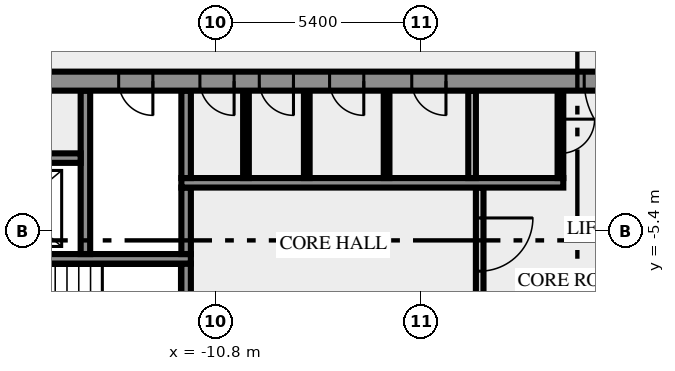
"""IFC4 building model, lengths in metres.
Left out: names, types, materials, properties, quantities, classifications, styles, units other than length and angle.
Written with IfcOpenShell. Run it as: python <this file> out.ifc"""

import sys

from ifc_helpers import new_model, si_unit, direction, frame, frame_2d, origin, place, context, subcontext, project, spatial, rectangle, extrude, element, fill, save


model = new_model("IFC4")
c1 = context("Model", 3, precision=1e-05, world=origin(), true_north=direction((0.0, 1.0)))
c2 = subcontext(c1, "Body", "Model", "MODEL_VIEW")
j1 = project(units=[si_unit("LENGTHUNIT", "METRE"), si_unit("PLANEANGLEUNIT", "RADIAN")], contexts=[c1])
p1 = place(None, origin())
s1 = spatial("IfcSite", under=j1, at=p1, CompositionType="ELEMENT")
p2 = place(p1, origin())
s2 = spatial("IfcBuilding", under=s1, at=p2, CompositionType="ELEMENT")
p3 = place(p2, frame((0.0, 0.0, 180.0)))
s3 = spatial("IfcBuildingStorey", under=s2, at=p3, CompositionType="ELEMENT", Elevation=180.0)
p4 = place(p3, frame((-11.575, -7.25, 0.0), z_axis=(0.0, 0.0, 1.0), x_axis=(0.0, 1.0, 0.0)))
e1 = element("IfcWall", 1, at=p4, inside=s3, PredefinedType="SHEAR", context=c2, shape_type="SweptSolid", body=[
    extrude(rectangle(XDim=1.0, YDim=0.25, at=frame_2d((0.5, 0.0))), origin(), (0.0, 0.0, 1.0), 3.65),
])
p5 = place(p3, frame((-3.85, -4.25, 0.0), z_axis=(0.0, 0.0, 1.0), x_axis=(0.0, -1.0, 0.0)))
e2 = element("IfcWall", 2, at=p5, inside=s3, PredefinedType="SOLIDWALL", context=c2, shape_type="SweptSolid", body=[
    extrude(rectangle(XDim=3.0, YDim=0.2, at=frame_2d((1.5, 0.0))), origin(), (0.0, 0.0, 1.0), 3.65),
])
p6 = place(p5, frame((0.8, 0.0, 0.0)))
e3 = element("IfcOpeningElement", 3, at=p6, cuts=e2, PredefinedType="OPENING", context=c2, shape_type="SweptSolid", body=[
    extrude(rectangle(XDim=1.4, YDim=2.1, at=frame_2d((0.7, 1.05))), frame((0.0, 0.11, 0.0), z_axis=(0.0, -1.0, 0.0), x_axis=(1.0, 0.0, 0.0)), (0.0, 0.0, 1.0), 0.22),
])
p7 = place(p3, frame((-11.45, -6.125, 0.0), z_axis=(0.0, 0.0, 1.0), x_axis=(-1.0, 0.0, 0.0)))
e4 = element("IfcWall", 4, at=p7, inside=s3, PredefinedType="SHEAR", context=c2, shape_type="SweptSolid", body=[
    extrude(rectangle(XDim=8.05, YDim=0.25, at=frame_2d((4.025, 0.0))), origin(), (0.0, 0.0, 1.0), 3.65),
])
p8 = place(p7, frame((6.2, 0.0, 0.0)))
e5 = element("IfcOpeningElement", 5, at=p8, cuts=e4, PredefinedType="OPENING", context=c2, shape_type="SweptSolid", body=[
    extrude(rectangle(XDim=1.8, YDim=2.1, at=frame_2d((0.9, 1.05))), frame((0.0, 0.135, 0.0), z_axis=(0.0, -1.0, 0.0), x_axis=(1.0, 0.0, 0.0)), (0.0, 0.0, 1.0), 0.27),
])
p9 = place(p3, frame((-14.225, -6.0, 0.0), z_axis=(0.0, 0.0, 1.0), x_axis=(0.0, 1.0, 0.0)))
e6 = element("IfcWall", 6, at=p9, inside=s3, PredefinedType="SHEAR", context=c2, shape_type="SweptSolid", body=[
    extrude(rectangle(XDim=4.3, YDim=0.25, at=frame_2d((2.15, 0.0))), origin(), (0.0, 0.0, 1.0), 3.65),
])
p10 = place(p3, frame((-11.575, -6.0, 0.0), z_axis=(0.0, 0.0, 1.0), x_axis=(0.0, 1.0, 0.0)))
e7 = element("IfcWall", 7, at=p10, inside=s3, PredefinedType="SHEAR", context=c2, shape_type="SweptSolid", body=[
    extrude(rectangle(XDim=1.75, YDim=0.25, at=frame_2d((0.875, 0.0))), origin(), (0.0, 0.0, 1.0), 3.65),
])
p11 = place(p3, frame((-11.7, -4.125, 0.0), z_axis=(0.0, 0.0, 1.0), x_axis=(1.0, 0.0, 0.0)))
e8 = element("IfcWall", 8, at=p11, inside=s3, PredefinedType="SHEAR", context=c2, shape_type="SweptSolid", body=[
    extrude(rectangle(XDim=10.05, YDim=0.25, at=frame_2d((5.025, 0.0))), origin(), (0.0, 0.0, 1.0), 3.65),
])
p12 = place(p3, frame((-11.575, -4.0, 0.0), z_axis=(0.0, 0.0, 1.0), x_axis=(0.0, 1.0, 0.0)))
e9 = element("IfcWall", 9, at=p12, inside=s3, PredefinedType="SHEAR", context=c2, shape_type="SweptSolid", body=[
    extrude(rectangle(XDim=2.3, YDim=0.25, at=frame_2d((1.15, 0.0))), origin(), (0.0, 0.0, 1.0), 3.65),
])
for number, where, z_axis, x_axis in (
    (10, (-10.0, -4.0, 0.0), (0.0, 0.0, 1.0), (0.0, 1.0, 0.0)),
    (11, (-8.4, -4.0, 0.0), (0.0, 0.0, 1.0), (0.0, 1.0, 0.0)),
    (12, (-6.3, -4.0, 0.0), (0.0, 0.0, 1.0), (0.0, 1.0, 0.0)),
):
    element("IfcWall", number, at=place(p3, frame(where, z_axis=z_axis, x_axis=x_axis)), inside=s3, PredefinedType="PARTITIONING", context=c2, shape_type="SweptSolid", body=[
        extrude(rectangle(XDim=2.3, YDim=0.15, at=frame_2d((1.15, 0.0))), origin(), (0.0, 0.0, 1.0), 3.65),
    ])
p13 = place(p3, frame((-4.05, -4.0, 0.0), z_axis=(0.0, 0.0, 1.0), x_axis=(0.0, 1.0, 0.0)))
e13 = element("IfcWall", 13, at=p13, inside=s3, PredefinedType="SOLIDWALL", context=c2, shape_type="SweptSolid", body=[
    extrude(rectangle(XDim=2.3, YDim=0.2, at=frame_2d((1.15, 0.0))), origin(), (0.0, 0.0, 1.0), 3.65),
])
p14 = place(p3, frame((-1.725, -1.7, 0.0), z_axis=(0.0, 0.0, 1.0), x_axis=(0.0, -1.0, 0.0)))
e14 = element("IfcWall", 14, at=p14, inside=s3, PredefinedType="PARTITIONING", context=c2, shape_type="SweptSolid", body=[
    extrude(rectangle(XDim=2.3, YDim=0.15, at=frame_2d((1.15, 0.0))), origin(), (0.0, 0.0, 1.0), 3.65),
])
p15 = place(p14, frame((0.75, 0.0, 0.0)))
e15 = element("IfcOpeningElement", 15, at=p15, cuts=e14, PredefinedType="OPENING", context=c2, shape_type="SweptSolid", body=[
    extrude(rectangle(XDim=0.9, YDim=2.1, at=frame_2d((0.45, 1.05))), frame((0.0, 0.085, 0.0), z_axis=(0.0, -1.0, 0.0), x_axis=(1.0, 0.0, 0.0)), (0.0, 0.0, 1.0), 0.17),
])
p16 = place(p3, frame((-17.35, -3.475, 0.0), z_axis=(0.0, 0.0, 1.0), x_axis=(1.0, 0.0, 0.0)))
e16 = element("IfcWall", 16, at=p16, inside=s3, PredefinedType="SHEAR", context=c2, shape_type="SweptSolid", body=[
    extrude(rectangle(XDim=3.0, YDim=0.25, at=frame_2d((1.5, 0.0))), origin(), (0.0, 0.0, 1.0), 3.65),
])
p17 = place(p3, frame((20.49, -1.45, 0.0), z_axis=(0.0, 0.0, 1.0), x_axis=(-1.0, 0.0, 0.0)))
e17 = element("IfcWall", 17, at=p17, inside=s3, PredefinedType="SHEAR", context=c2, shape_type="SweptSolid", body=[
    extrude(rectangle(XDim=40.98, YDim=0.5, at=frame_2d((20.49, 0.0))), origin(), (0.0, 0.0, 1.0), 3.65),
])
p18 = place(p17, frame((38.14, 0.0, 0.0)))
e18 = element("IfcOpeningElement", 18, at=p18, cuts=e17, PredefinedType="OPENING", context=c2, shape_type="SweptSolid", body=[
    extrude(rectangle(XDim=1.8, YDim=2.1, at=frame_2d((0.9, 1.05))), frame((0.0, 0.26, 0.0), z_axis=(0.0, -1.0, 0.0), x_axis=(1.0, 0.0, 0.0)), (0.0, 0.0, 1.0), 0.52),
])
p19 = place(p17, frame((35.89, 0.0, 0.0)))
e19 = element("IfcOpeningElement", 19, at=p19, cuts=e17, PredefinedType="OPENING", context=c2, shape_type="SweptSolid", body=[
    extrude(rectangle(XDim=0.9, YDim=2.1, at=frame_2d((0.45, 1.05))), frame((0.0, 0.26, 0.0), z_axis=(0.0, -1.0, 0.0), x_axis=(1.0, 0.0, 0.0)), (0.0, 0.0, 1.0), 0.52),
])
p20 = place(p17, frame((32.94, 0.0, 0.0)))
e20 = element("IfcOpeningElement", 20, at=p20, cuts=e17, PredefinedType="OPENING", context=c2, shape_type="SweptSolid", body=[
    extrude(rectangle(XDim=0.9, YDim=2.1, at=frame_2d((0.45, 1.05))), frame((0.0, 0.26, 0.0), z_axis=(0.0, -1.0, 0.0), x_axis=(1.0, 0.0, 0.0)), (0.0, 0.0, 1.0), 0.52),
])
p21 = place(p17, frame((30.802, 0.0, 0.0)))
e21 = element("IfcOpeningElement", 21, at=p21, cuts=e17, PredefinedType="OPENING", context=c2, shape_type="SweptSolid", body=[
    extrude(rectangle(XDim=0.9, YDim=2.1, at=frame_2d((0.45, 1.05))), frame((0.0, 0.26, 0.0), z_axis=(0.0, -1.0, 0.0), x_axis=(1.0, 0.0, 0.0)), (0.0, 0.0, 1.0), 0.52),
])
p22 = place(p17, frame((29.24, 0.0, 0.0)))
e22 = element("IfcOpeningElement", 22, at=p22, cuts=e17, PredefinedType="OPENING", context=c2, shape_type="SweptSolid", body=[
    extrude(rectangle(XDim=0.9, YDim=2.1, at=frame_2d((0.45, 1.05))), frame((0.0, 0.26, 0.0), z_axis=(0.0, -1.0, 0.0), x_axis=(1.0, 0.0, 0.0)), (0.0, 0.0, 1.0), 0.52),
])
p23 = place(p17, frame((27.39, 0.0, 0.0)))
e23 = element("IfcOpeningElement", 23, at=p23, cuts=e17, PredefinedType="OPENING", context=c2, shape_type="SweptSolid", body=[
    extrude(rectangle(XDim=0.9, YDim=2.1, at=frame_2d((0.45, 1.05))), frame((0.0, 0.26, 0.0), z_axis=(0.0, -1.0, 0.0), x_axis=(1.0, 0.0, 0.0)), (0.0, 0.0, 1.0), 0.52),
])
p24 = place(p17, frame((25.228, 0.0, 0.0)))
e24 = element("IfcOpeningElement", 24, at=p24, cuts=e17, PredefinedType="OPENING", context=c2, shape_type="SweptSolid", body=[
    extrude(rectangle(XDim=0.9, YDim=2.1, at=frame_2d((0.45, 1.05))), frame((0.0, 0.26, 0.0), z_axis=(0.0, -1.0, 0.0), x_axis=(1.0, 0.0, 0.0)), (0.0, 0.0, 1.0), 0.52),
])
p25 = place(p17, frame((19.59, 0.0, 0.0)))
e25 = element("IfcOpeningElement", 25, at=p25, cuts=e17, PredefinedType="OPENING", context=c2, shape_type="SweptSolid", body=[
    extrude(rectangle(XDim=2.0, YDim=2.1, at=frame_2d((1.0, 1.05))), frame((0.0, 0.26, 0.0), z_axis=(0.0, -1.0, 0.0), x_axis=(1.0, 0.0, 0.0)), (0.0, 0.0, 1.0), 0.52),
])
p26 = place(p17, frame((7.14, 0.0, 0.0)))
e26 = element("IfcOpeningElement", 26, at=p26, cuts=e17, PredefinedType="OPENING", context=c2, shape_type="SweptSolid", body=[
    extrude(rectangle(XDim=0.9, YDim=2.1, at=frame_2d((0.45, 1.05))), frame((0.0, 0.26, 0.0), z_axis=(0.0, -1.0, 0.0), x_axis=(1.0, 0.0, 0.0)), (0.0, 0.0, 1.0), 0.52),
])
p27 = place(p17, frame((5.028, 0.0, 0.0)))
e27 = element("IfcOpeningElement", 27, at=p27, cuts=e17, PredefinedType="OPENING", context=c2, shape_type="SweptSolid", body=[
    extrude(rectangle(XDim=0.8, YDim=2.1, at=frame_2d((0.4, 1.05))), frame((0.0, 0.26, 0.0), z_axis=(0.0, -1.0, 0.0), x_axis=(1.0, 0.0, 0.0)), (0.0, 0.0, 1.0), 0.52),
])
p28 = place(p17, frame((3.452, 0.0, 0.0)))
e28 = element("IfcOpeningElement", 28, at=p28, cuts=e17, PredefinedType="OPENING", context=c2, shape_type="SweptSolid", body=[
    extrude(rectangle(XDim=0.8, YDim=2.1, at=frame_2d((0.4, 1.05))), frame((0.0, 0.26, 0.0), z_axis=(0.0, -1.0, 0.0), x_axis=(1.0, 0.0, 0.0)), (0.0, 0.0, 1.0), 0.52),
])
p29 = place(p17, frame((1.04, 0.0, 0.0)))
e29 = element("IfcOpeningElement", 29, at=p29, cuts=e17, PredefinedType="OPENING", context=c2, shape_type="SweptSolid", body=[
    extrude(rectangle(XDim=1.8, YDim=2.1, at=frame_2d((0.9, 1.05))), frame((0.0, 0.26, 0.0), z_axis=(0.0, -1.0, 0.0), x_axis=(1.0, 0.0, 0.0)), (0.0, 0.0, 1.0), 0.52),
])
p30 = place(p6, origin())
e30 = element("IfcDoor", 30, at=p30, inside=s3, OperationType="DOUBLE_DOOR_SINGLE_SWING", PredefinedType="DOOR", context=c2, shape_type="SweptSolid", body=[
    extrude(rectangle(XDim=1.4, YDim=2.1, at=frame_2d((0.7, 1.05))), frame((0.0, 0.025, 0.0), z_axis=(0.0, -1.0, 0.0), x_axis=(1.0, 0.0, 0.0)), (0.0, 0.0, 1.0), 0.05),
])
fill(e3, e30)
p31 = place(p15, origin())
e31 = element("IfcDoor", 31, at=p31, inside=s3, OperationType="SINGLE_SWING_RIGHT", PredefinedType="DOOR", context=c2, shape_type="SweptSolid", body=[
    extrude(rectangle(XDim=0.9, YDim=2.1, at=frame_2d((0.45, 1.05))), frame((0.0, 0.025, 0.0), z_axis=(0.0, -1.0, 0.0), x_axis=(1.0, 0.0, 0.0)), (0.0, 0.0, 1.0), 0.05),
])
fill(e15, e31)
p32 = place(p20, origin())
e32 = element("IfcDoor", 32, at=p32, inside=s3, OperationType="SINGLE_SWING_RIGHT", PredefinedType="DOOR", context=c2, shape_type="SweptSolid", body=[
    extrude(rectangle(XDim=0.9, YDim=2.1, at=frame_2d((0.45, 1.05))), frame((0.0, 0.025, 0.0), z_axis=(0.0, -1.0, 0.0), x_axis=(1.0, 0.0, 0.0)), (0.0, 0.0, 1.0), 0.05),
])
fill(e20, e32)
p33 = place(p21, origin())
e33 = element("IfcDoor", 33, at=p33, inside=s3, OperationType="SINGLE_SWING_RIGHT", PredefinedType="DOOR", context=c2, shape_type="SweptSolid", body=[
    extrude(rectangle(XDim=0.9, YDim=2.1, at=frame_2d((0.45, 1.05))), frame((0.0, 0.025, 0.0), z_axis=(0.0, -1.0, 0.0), x_axis=(1.0, 0.0, 0.0)), (0.0, 0.0, 1.0), 0.05),
])
fill(e21, e33)
p34 = place(p22, origin())
e34 = element("IfcDoor", 34, at=p34, inside=s3, OperationType="SINGLE_SWING_RIGHT", PredefinedType="DOOR", context=c2, shape_type="SweptSolid", body=[
    extrude(rectangle(XDim=0.9, YDim=2.1, at=frame_2d((0.45, 1.05))), frame((0.0, 0.025, 0.0), z_axis=(0.0, -1.0, 0.0), x_axis=(1.0, 0.0, 0.0)), (0.0, 0.0, 1.0), 0.05),
])
fill(e22, e34)
p35 = place(p23, origin())
e35 = element("IfcDoor", 35, at=p35, inside=s3, OperationType="SINGLE_SWING_RIGHT", PredefinedType="DOOR", context=c2, shape_type="SweptSolid", body=[
    extrude(rectangle(XDim=0.9, YDim=2.1, at=frame_2d((0.45, 1.05))), frame((0.0, 0.025, 0.0), z_axis=(0.0, -1.0, 0.0), x_axis=(1.0, 0.0, 0.0)), (0.0, 0.0, 1.0), 0.05),
])
fill(e23, e35)
p36 = place(p24, origin())
e36 = element("IfcDoor", 36, at=p36, inside=s3, OperationType="SINGLE_SWING_RIGHT", PredefinedType="DOOR", context=c2, shape_type="SweptSolid", body=[
    extrude(rectangle(XDim=0.9, YDim=2.1, at=frame_2d((0.45, 1.05))), frame((0.0, 0.025, 0.0), z_axis=(0.0, -1.0, 0.0), x_axis=(1.0, 0.0, 0.0)), (0.0, 0.0, 1.0), 0.05),
])
fill(e24, e36)
p37 = place(p25, origin())
e37 = element("IfcDoor", 37, at=p37, inside=s3, OperationType="DOUBLE_DOOR_SINGLE_SWING", PredefinedType="DOOR", context=c2, shape_type="SweptSolid", body=[
    extrude(rectangle(XDim=2.0, YDim=2.1, at=frame_2d((1.0, 1.05))), frame((0.0, 0.025, 0.0), z_axis=(0.0, -1.0, 0.0), x_axis=(1.0, 0.0, 0.0)), (0.0, 0.0, 1.0), 0.05),
])
fill(e25, e37)
save(model, sys.argv[1])
